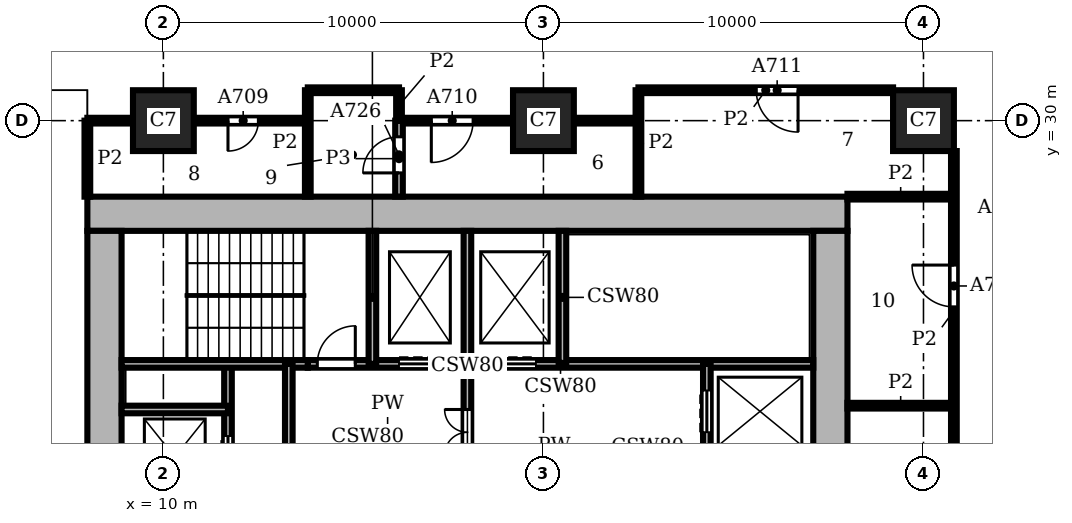
"""IFC4 building model, lengths in metres.
Left out: names, types, materials, properties, quantities, classifications, styles, units other than length and angle.
Written with IfcOpenShell. Run it as: python <this file> out.ifc"""

import sys

from ifc_helpers import new_model, si_unit, direction, frame, frame_2d, origin, origin_2d, place, context, subcontext, project, spatial, rectangle, extrude, element, fill, save


model = new_model("IFC4")
c1 = context("Model", 3, precision=1e-05, world=origin(), true_north=direction((0.0, 1.0)))
c2 = subcontext(c1, "Body", "Model", "MODEL_VIEW")
j1 = project(units=[si_unit("LENGTHUNIT", "METRE"), si_unit("PLANEANGLEUNIT", "RADIAN")], contexts=[c1])
p1 = place(None, origin())
s1 = spatial("IfcSite", under=j1, at=p1, CompositionType="ELEMENT")
p2 = place(p1, origin())
s2 = spatial("IfcBuilding", under=s1, at=p2, CompositionType="ELEMENT")
p3 = place(p2, frame((0.0, 0.0, 86.1)))
s3 = spatial("IfcBuildingStorey", under=s2, at=p3, CompositionType="ELEMENT", Elevation=86.1)
for number, where, z_axis, x_axis in (
    (1, (10.0, 30.0, 0.0), (0.0, 0.0, 1.0), (1.0, 0.0, 0.0)),
    (2, (20.0, 30.0, 0.0), (0.0, 0.0, 1.0), (1.0, 0.0, 0.0)),
    (3, (30.0, 30.0, 0.0), (0.0, 0.0, 1.0), (1.0, 0.0, 0.0)),
):
    element("IfcColumn", number, at=place(p3, frame(where, z_axis=z_axis, x_axis=x_axis)), inside=s3, PredefinedType="COLUMN", context=c2, shape_type="SweptSolid", body=[
        extrude(rectangle(XDim=1.6, YDim=1.6, at=origin_2d()), origin(), (0.0, 0.0, 1.0), 3.9),
    ])
p4 = place(p3, frame((27.55, 8.9, 0.0), z_axis=(0.0, 0.0, 1.0), x_axis=(0.0, 1.0, 0.0)))
e4 = element("IfcWall", 4, at=p4, inside=s3, PredefinedType="SHEAR", context=c2, shape_type="SweptSolid", body=[
    extrude(rectangle(XDim=18.2, YDim=0.9, at=frame_2d((9.1, 0.0))), origin(), (0.0, 0.0, 1.0), 3.9),
])
p5 = place(p4, frame((4.55, 0.0, 0.0)))
e5 = element("IfcOpeningElement", 5, at=p5, cuts=e4, PredefinedType="OPENING", context=c2, shape_type="SweptSolid", body=[
    extrude(rectangle(XDim=1.6, YDim=2.1, at=frame_2d((0.8, 1.05))), frame((0.0, 0.46, 0.0), z_axis=(0.0, -1.0, 0.0), x_axis=(1.0, 0.0, 0.0)), (0.0, 0.0, 1.0), 0.92),
])
p6 = place(p3, frame((28.0, 27.55, 0.0), z_axis=(0.0, 0.0, 1.0), x_axis=(-1.0, 0.0, 0.0)))
e6 = element("IfcWall", 6, at=p6, inside=s3, PredefinedType="SHEAR", context=c2, shape_type="SweptSolid", body=[
    extrude(rectangle(XDim=20.0, YDim=0.9, at=frame_2d((10.0, 0.0))), origin(), (0.0, 0.0, 1.0), 3.9),
])
p7 = place(p3, frame((8.45, 27.1, 0.0), z_axis=(0.0, 0.0, 1.0), x_axis=(0.0, -1.0, 0.0)))
e7 = element("IfcWall", 7, at=p7, inside=s3, PredefinedType="SHEAR", context=c2, shape_type="SweptSolid", body=[
    extrude(rectangle(XDim=18.2, YDim=0.9, at=frame_2d((9.1, 0.0))), origin(), (0.0, 0.0, 1.0), 3.9),
])
p8 = place(p3, frame((8.9, 22.4, 0.0), z_axis=(0.0, 0.0, 1.0), x_axis=(1.0, 0.0, 0.0)))
e8 = element("IfcWall", 8, at=p8, inside=s3, PredefinedType="SHEAR", context=c2, shape_type="SweptSolid", body=[
    extrude(rectangle(XDim=2.8, YDim=0.2, at=frame_2d((1.4, 0.0))), origin(), (0.0, 0.0, 1.0), 3.58),
])
p9 = place(p3, frame((8.9, 23.6, 0.0), z_axis=(0.0, 0.0, 1.0), x_axis=(1.0, 0.0, 0.0)))
e9 = element("IfcWall", 9, at=p9, inside=s3, PredefinedType="SHEAR", context=c2, shape_type="SweptSolid", body=[
    extrude(rectangle(XDim=4.9, YDim=0.2, at=frame_2d((2.45, 0.0))), origin(), (0.0, 0.0, 1.0), 3.58),
])
p10 = place(p3, frame((13.8, 23.6, 0.0), z_axis=(0.0, 0.0, 1.0), x_axis=(1.0, 0.0, 0.0)))
e10 = element("IfcWall", 10, at=p10, inside=s3, PredefinedType="SHEAR", context=c2, shape_type="SweptSolid", body=[
    extrude(rectangle(XDim=13.3, YDim=0.2, at=frame_2d((6.65, 0.0))), origin(), (0.0, 0.0, 1.0), 3.58),
])
p11 = place(p10, frame((2.4, 0.0, 0.0)))
e11 = element("IfcOpeningElement", 11, at=p11, cuts=e10, PredefinedType="OPENING", context=c2, shape_type="SweptSolid", body=[
    extrude(rectangle(XDim=1.1, YDim=2.1, at=frame_2d((0.55, 1.05))), frame((0.0, 0.11, 0.0), z_axis=(0.0, -1.0, 0.0), x_axis=(1.0, 0.0, 0.0)), (0.0, 0.0, 1.0), 0.22),
])
p12 = place(p10, frame((4.9, 0.0, 0.0)))
e12 = element("IfcOpeningElement", 12, at=p12, cuts=e10, PredefinedType="OPENING", context=c2, shape_type="SweptSolid", body=[
    extrude(rectangle(XDim=1.1, YDim=2.1, at=frame_2d((0.55, 1.05))), frame((0.0, 0.11, 0.0), z_axis=(0.0, -1.0, 0.0), x_axis=(1.0, 0.0, 0.0)), (0.0, 0.0, 1.0), 0.22),
])
p13 = place(p10, frame((0.25, 0.0, 0.0)))
e13 = element("IfcOpeningElement", 13, at=p13, cuts=e10, PredefinedType="OPENING", context=c2, shape_type="SweptSolid", body=[
    extrude(rectangle(XDim=1.0, YDim=2.1, at=frame_2d((0.5, 1.05))), frame((0.0, 0.11, 0.0), z_axis=(0.0, -1.0, 0.0), x_axis=(1.0, 0.0, 0.0)), (0.0, 0.0, 1.0), 0.22),
])
p14 = place(p3, frame((11.7, 12.4, 0.0), z_axis=(0.0, 0.0, 1.0), x_axis=(0.0, 1.0, 0.0)))
e14 = element("IfcWall", 14, at=p14, inside=s3, PredefinedType="SHEAR", context=c2, shape_type="SweptSolid", body=[
    extrude(rectangle(XDim=11.2, YDim=0.2, at=frame_2d((5.6, 0.0))), origin(), (0.0, 0.0, 1.0), 3.58),
])
p15 = place(p14, frame((0.7, 0.0, 0.0)))
e15 = element("IfcOpeningElement", 15, at=p15, cuts=e14, PredefinedType="OPENING", context=c2, shape_type="SweptSolid", body=[
    extrude(rectangle(XDim=1.1, YDim=2.1, at=frame_2d((0.55, 1.05))), frame((0.0, 0.11, 0.0), z_axis=(0.0, -1.0, 0.0), x_axis=(1.0, 0.0, 0.0)), (0.0, 0.0, 1.0), 0.22),
])
p16 = place(p14, frame((3.2, 0.0, 0.0)))
e16 = element("IfcOpeningElement", 16, at=p16, cuts=e14, PredefinedType="OPENING", context=c2, shape_type="SweptSolid", body=[
    extrude(rectangle(XDim=1.1, YDim=2.1, at=frame_2d((0.55, 1.05))), frame((0.0, 0.11, 0.0), z_axis=(0.0, -1.0, 0.0), x_axis=(1.0, 0.0, 0.0)), (0.0, 0.0, 1.0), 0.22),
])
p17 = place(p14, frame((5.7, 0.0, 0.0)))
e17 = element("IfcOpeningElement", 17, at=p17, cuts=e14, PredefinedType="OPENING", context=c2, shape_type="SweptSolid", body=[
    extrude(rectangle(XDim=1.1, YDim=2.1, at=frame_2d((0.55, 1.05))), frame((0.0, 0.11, 0.0), z_axis=(0.0, -1.0, 0.0), x_axis=(1.0, 0.0, 0.0)), (0.0, 0.0, 1.0), 0.22),
])
p18 = place(p14, frame((8.2, 0.0, 0.0)))
e18 = element("IfcOpeningElement", 18, at=p18, cuts=e14, PredefinedType="OPENING", context=c2, shape_type="SweptSolid", body=[
    extrude(rectangle(XDim=1.1, YDim=2.1, at=frame_2d((0.55, 1.05))), frame((0.0, 0.11, 0.0), z_axis=(0.0, -1.0, 0.0), x_axis=(1.0, 0.0, 0.0)), (0.0, 0.0, 1.0), 0.22),
])
p19 = place(p3, frame((13.3, 20.0, 0.0), z_axis=(0.0, 0.0, 1.0), x_axis=(0.0, 1.0, 0.0)))
e19 = element("IfcWall", 19, at=p19, inside=s3, PredefinedType="SHEAR", context=c2, shape_type="SweptSolid", body=[
    extrude(rectangle(XDim=3.6, YDim=0.2, at=frame_2d((1.8, 0.0))), origin(), (0.0, 0.0, 1.0), 3.58),
])
p20 = place(p3, frame((15.5, 23.6, 0.0), z_axis=(0.0, 0.0, 1.0), x_axis=(0.0, 1.0, 0.0)))
e20 = element("IfcWall", 20, at=p20, inside=s3, PredefinedType="SHEAR", context=c2, shape_type="SweptSolid", body=[
    extrude(rectangle(XDim=3.5, YDim=0.2, at=frame_2d((1.75, 0.0))), origin(), (0.0, 0.0, 1.0), 3.58),
])
p21 = place(p3, frame((18.0, 20.0, 0.0), z_axis=(0.0, 0.0, 1.0), x_axis=(0.0, 1.0, 0.0)))
e21 = element("IfcWall", 21, at=p21, inside=s3, PredefinedType="SHEAR", context=c2, shape_type="SweptSolid", body=[
    extrude(rectangle(XDim=7.1, YDim=0.2, at=frame_2d((3.55, 0.0))), origin(), (0.0, 0.0, 1.0), 3.58),
])
p22 = place(p21, frame((1.2, 0.0, 0.0)))
e22 = element("IfcOpeningElement", 22, at=p22, cuts=e21, PredefinedType="OPENING", context=c2, shape_type="SweptSolid", body=[
    extrude(rectangle(XDim=1.2, YDim=2.1, at=frame_2d((0.6, 1.05))), frame((0.0, 0.11, 0.0), z_axis=(0.0, -1.0, 0.0), x_axis=(1.0, 0.0, 0.0)), (0.0, 0.0, 1.0), 0.22),
])
p23 = place(p3, frame((20.5, 23.6, 0.0), z_axis=(0.0, 0.0, 1.0), x_axis=(0.0, 1.0, 0.0)))
e23 = element("IfcWall", 23, at=p23, inside=s3, PredefinedType="SHEAR", context=c2, shape_type="SweptSolid", body=[
    extrude(rectangle(XDim=3.5, YDim=0.2, at=frame_2d((1.75, 0.0))), origin(), (0.0, 0.0, 1.0), 3.58),
])
p24 = place(p3, frame((24.3, 16.1, 0.0), z_axis=(0.0, 0.0, 1.0), x_axis=(0.0, 1.0, 0.0)))
e24 = element("IfcWall", 24, at=p24, inside=s3, PredefinedType="SHEAR", context=c2, shape_type="SweptSolid", body=[
    extrude(rectangle(XDim=7.5, YDim=0.2, at=frame_2d((3.75, 0.0))), origin(), (0.0, 0.0, 1.0), 3.58),
])
p25 = place(p24, frame((5.7, 0.0, 0.0)))
e25 = element("IfcOpeningElement", 25, at=p25, cuts=e24, PredefinedType="OPENING", context=c2, shape_type="SweptSolid", body=[
    extrude(rectangle(XDim=1.1, YDim=2.1, at=frame_2d((0.55, 1.05))), frame((0.0, 0.11, 0.0), z_axis=(0.0, -1.0, 0.0), x_axis=(1.0, 0.0, 0.0)), (0.0, 0.0, 1.0), 0.22),
])
p26 = place(p3, frame((8.0, 28.0, 0.0), z_axis=(0.0, 0.0, 1.0), x_axis=(0.0, 1.0, 0.0)))
e26 = element("IfcWall", 26, at=p26, inside=s3, PredefinedType="PARTITIONING", context=c2, shape_type="SweptSolid", body=[
    extrude(rectangle(XDim=2.0, YDim=0.15, at=frame_2d((1.0, 0.0))), origin(), (0.0, 0.0, 1.0), 3.58),
])
p27 = place(p3, frame((13.8, 28.0, 0.0), z_axis=(0.0, 0.0, 1.0), x_axis=(0.0, 1.0, 0.0)))
e27 = element("IfcWall", 27, at=p27, inside=s3, PredefinedType="PARTITIONING", context=c2, shape_type="SweptSolid", body=[
    extrude(rectangle(XDim=2.8, YDim=0.15, at=frame_2d((1.4, 0.0))), origin(), (0.0, 0.0, 1.0), 3.58),
])
p28 = place(p3, frame((16.2, 30.0, 0.0), z_axis=(0.0, 0.0, 1.0), x_axis=(0.0, 1.0, 0.0)))
e28 = element("IfcWall", 28, at=p28, inside=s3, PredefinedType="PARTITIONING", context=c2, shape_type="SweptSolid", body=[
    extrude(rectangle(XDim=0.8, YDim=0.15, at=frame_2d((0.4, 0.0))), origin(), (0.0, 0.0, 1.0), 3.58),
])
p29 = place(p3, frame((22.5, 28.0, 0.0), z_axis=(0.0, 0.0, 1.0), x_axis=(0.0, 1.0, 0.0)))
e29 = element("IfcWall", 29, at=p29, inside=s3, PredefinedType="PARTITIONING", context=c2, shape_type="SweptSolid", body=[
    extrude(rectangle(XDim=2.8, YDim=0.15, at=frame_2d((1.4, 0.0))), origin(), (0.0, 0.0, 1.0), 3.58),
])
p30 = place(p3, frame((30.8, 20.8, 0.0), z_axis=(0.0, 0.0, 1.0), x_axis=(0.0, 1.0, 0.0)))
e30 = element("IfcWall", 30, at=p30, inside=s3, PredefinedType="PARTITIONING", context=c2, shape_type="SweptSolid", body=[
    extrude(rectangle(XDim=8.4, YDim=0.15, at=frame_2d((4.2, 0.0))), origin(), (0.0, 0.0, 1.0), 3.58),
])
p31 = place(p30, frame((4.3, 0.0, 0.0)))
e31 = element("IfcOpeningElement", 31, at=p31, cuts=e30, PredefinedType="OPENING", context=c2, shape_type="SweptSolid", body=[
    extrude(rectangle(XDim=1.1, YDim=2.1, at=frame_2d((0.55, 1.05))), frame((0.0, 0.085, 0.0), z_axis=(0.0, -1.0, 0.0), x_axis=(1.0, 0.0, 0.0)), (0.0, 0.0, 1.0), 0.17),
])
for number, where, z_axis, x_axis in (
    (32, (28.0, 22.5, 0.0), (0.0, 0.0, 1.0), (1.0, 0.0, 0.0)),
    (33, (28.0, 28.0, 0.0), (0.0, 0.0, 1.0), (1.0, 0.0, 0.0)),
):
    element("IfcWall", number, at=place(p3, frame(where, z_axis=z_axis, x_axis=x_axis)), inside=s3, PredefinedType="PARTITIONING", context=c2, shape_type="SweptSolid", body=[
        extrude(rectangle(XDim=2.8, YDim=0.15, at=frame_2d((1.4, 0.0))), origin(), (0.0, 0.0, 1.0), 3.58),
    ])
p32 = place(p3, frame((8.0, 30.0, 0.0), z_axis=(0.0, 0.0, 1.0), x_axis=(1.0, 0.0, 0.0)))
e34 = element("IfcWall", 34, at=p32, inside=s3, PredefinedType="PARTITIONING", context=c2, shape_type="SweptSolid", body=[
    extrude(rectangle(XDim=1.2, YDim=0.15, at=frame_2d((0.6, 0.0))), origin(), (0.0, 0.0, 1.0), 3.58),
])
p33 = place(p3, frame((10.8, 30.0, 0.0), z_axis=(0.0, 0.0, 1.0), x_axis=(1.0, 0.0, 0.0)))
e35 = element("IfcWall", 35, at=p33, inside=s3, PredefinedType="PARTITIONING", context=c2, shape_type="SweptSolid", body=[
    extrude(rectangle(XDim=3.0, YDim=0.15, at=frame_2d((1.5, 0.0))), origin(), (0.0, 0.0, 1.0), 3.58),
])
p34 = place(p33, frame((0.9, 0.0, 0.0)))
e36 = element("IfcOpeningElement", 36, at=p34, cuts=e35, PredefinedType="OPENING", context=c2, shape_type="SweptSolid", body=[
    extrude(rectangle(XDim=0.8, YDim=2.1, at=frame_2d((0.4, 1.05))), frame((0.0, 0.085, 0.0), z_axis=(0.0, -1.0, 0.0), x_axis=(1.0, 0.0, 0.0)), (0.0, 0.0, 1.0), 0.17),
])
p35 = place(p3, frame((16.2, 30.0, 0.0), z_axis=(0.0, 0.0, 1.0), x_axis=(1.0, 0.0, 0.0)))
e37 = element("IfcWall", 37, at=p35, inside=s3, PredefinedType="PARTITIONING", context=c2, shape_type="SweptSolid", body=[
    extrude(rectangle(XDim=3.0, YDim=0.15, at=frame_2d((1.5, 0.0))), origin(), (0.0, 0.0, 1.0), 3.58),
])
p36 = place(p35, frame((0.85, 0.0, 0.0)))
e38 = element("IfcOpeningElement", 38, at=p36, cuts=e37, PredefinedType="OPENING", context=c2, shape_type="SweptSolid", body=[
    extrude(rectangle(XDim=1.1, YDim=2.1, at=frame_2d((0.55, 1.05))), frame((0.0, 0.085, 0.0), z_axis=(0.0, -1.0, 0.0), x_axis=(1.0, 0.0, 0.0)), (0.0, 0.0, 1.0), 0.17),
])
p37 = place(p3, frame((20.8, 30.0, 0.0), z_axis=(0.0, 0.0, 1.0), x_axis=(1.0, 0.0, 0.0)))
e39 = element("IfcWall", 39, at=p37, inside=s3, PredefinedType="PARTITIONING", context=c2, shape_type="SweptSolid", body=[
    extrude(rectangle(XDim=1.7, YDim=0.15, at=frame_2d((0.85, 0.0))), origin(), (0.0, 0.0, 1.0), 3.58),
])
p38 = place(p3, frame((13.8, 30.8, 0.0), z_axis=(0.0, 0.0, 1.0), x_axis=(1.0, 0.0, 0.0)))
e40 = element("IfcWall", 40, at=p38, inside=s3, PredefinedType="PARTITIONING", context=c2, shape_type="SweptSolid", body=[
    extrude(rectangle(XDim=2.4, YDim=0.15, at=frame_2d((1.2, 0.0))), origin(), (0.0, 0.0, 1.0), 3.58),
])
p39 = place(p3, frame((22.5, 30.8, 0.0), z_axis=(0.0, 0.0, 1.0), x_axis=(1.0, 0.0, 0.0)))
e41 = element("IfcWall", 41, at=p39, inside=s3, PredefinedType="PARTITIONING", context=c2, shape_type="SweptSolid", body=[
    extrude(rectangle(XDim=6.7, YDim=0.15, at=frame_2d((3.35, 0.0))), origin(), (0.0, 0.0, 1.0), 3.58),
])
p40 = place(p39, frame((3.1, 0.0, 0.0)))
e42 = element("IfcOpeningElement", 42, at=p40, cuts=e41, PredefinedType="OPENING", context=c2, shape_type="SweptSolid", body=[
    extrude(rectangle(XDim=1.1, YDim=2.1, at=frame_2d((0.55, 1.05))), frame((0.0, 0.085, 0.0), z_axis=(0.0, -1.0, 0.0), x_axis=(1.0, 0.0, 0.0)), (0.0, 0.0, 1.0), 0.17),
])
p41 = place(p3, frame((16.2, 28.0, 0.0), z_axis=(0.0, 0.0, 1.0), x_axis=(0.0, 1.0, 0.0)))
e43 = element("IfcWall", 43, at=p41, inside=s3, PredefinedType="PARTITIONING", context=c2, shape_type="SweptSolid", body=[
    extrude(rectangle(XDim=2.0, YDim=0.2, at=frame_2d((1.0, 0.0))), origin(), (0.0, 0.0, 1.0), 3.58),
])
p42 = place(p41, frame((0.625, 0.0, 0.0)))
e44 = element("IfcOpeningElement", 44, at=p42, cuts=e43, PredefinedType="OPENING", context=c2, shape_type="SweptSolid", body=[
    extrude(rectangle(XDim=0.95, YDim=2.1, at=frame_2d((0.475, 1.05))), frame((0.0, 0.11, 0.0), z_axis=(0.0, -1.0, 0.0), x_axis=(1.0, 0.0, 0.0)), (0.0, 0.0, 1.0), 0.22),
])
p43 = place(p18, origin())
e45 = element("IfcDoor", 45, at=p43, inside=s3, OperationType="DOUBLE_DOOR_SLIDING", PredefinedType="DOOR", context=c2, shape_type="SweptSolid", body=[
    extrude(rectangle(XDim=1.1, YDim=2.1, at=frame_2d((0.55, 1.05))), frame((0.0, 0.025, 0.0), z_axis=(0.0, -1.0, 0.0), x_axis=(1.0, 0.0, 0.0)), (0.0, 0.0, 1.0), 0.05),
])
fill(e18, e45)
p44 = place(p25, origin())
e46 = element("IfcDoor", 46, at=p44, inside=s3, OperationType="DOUBLE_DOOR_SLIDING", PredefinedType="DOOR", context=c2, shape_type="SweptSolid", body=[
    extrude(rectangle(XDim=1.1, YDim=2.1, at=frame_2d((0.55, 1.05))), frame((0.0, 0.025, 0.0), z_axis=(0.0, -1.0, 0.0), x_axis=(1.0, 0.0, 0.0)), (0.0, 0.0, 1.0), 0.05),
])
fill(e25, e46)
p45 = place(p11, origin())
e47 = element("IfcDoor", 47, at=p45, inside=s3, OperationType="DOUBLE_DOOR_SLIDING", PredefinedType="DOOR", context=c2, shape_type="SweptSolid", body=[
    extrude(rectangle(XDim=1.1, YDim=2.1, at=frame_2d((0.55, 1.05))), frame((0.0, 0.025, 0.0), z_axis=(0.0, -1.0, 0.0), x_axis=(1.0, 0.0, 0.0)), (0.0, 0.0, 1.0), 0.05),
])
fill(e11, e47)
p46 = place(p12, origin())
e48 = element("IfcDoor", 48, at=p46, inside=s3, OperationType="DOUBLE_DOOR_SLIDING", PredefinedType="DOOR", context=c2, shape_type="SweptSolid", body=[
    extrude(rectangle(XDim=1.1, YDim=2.1, at=frame_2d((0.55, 1.05))), frame((0.0, 0.025, 0.0), z_axis=(0.0, -1.0, 0.0), x_axis=(1.0, 0.0, 0.0)), (0.0, 0.0, 1.0), 0.05),
])
fill(e12, e48)
p47 = place(p13, origin())
e49 = element("IfcDoor", 49, at=p47, inside=s3, OperationType="SINGLE_SWING_RIGHT", PredefinedType="DOOR", context=c2, shape_type="SweptSolid", body=[
    extrude(rectangle(XDim=1.0, YDim=2.1, at=frame_2d((0.5, 1.05))), frame((0.0, 0.025, 0.0), z_axis=(0.0, -1.0, 0.0), x_axis=(1.0, 0.0, 0.0)), (0.0, 0.0, 1.0), 0.05),
])
fill(e13, e49)
p48 = place(p22, origin())
e50 = element("IfcDoor", 50, at=p48, inside=s3, OperationType="DOUBLE_DOOR_SINGLE_SWING", PredefinedType="DOOR", context=c2, shape_type="SweptSolid", body=[
    extrude(rectangle(XDim=1.2, YDim=2.1, at=frame_2d((0.6, 1.05))), frame((0.0, 0.025, 0.0), z_axis=(0.0, -1.0, 0.0), x_axis=(1.0, 0.0, 0.0)), (0.0, 0.0, 1.0), 0.05),
])
fill(e22, e50)
p49 = place(p31, origin())
e51 = element("IfcDoor", 51, at=p49, inside=s3, OperationType="SINGLE_SWING_RIGHT", PredefinedType="DOOR", context=c2, shape_type="SweptSolid", body=[
    extrude(rectangle(XDim=1.1, YDim=2.1, at=frame_2d((0.55, 1.05))), frame((0.0, 0.025, 0.0), z_axis=(0.0, -1.0, 0.0), x_axis=(1.0, 0.0, 0.0)), (0.0, 0.0, 1.0), 0.05),
])
fill(e31, e51)
p50 = place(p34, frame((0.8, 0.0, 0.0), z_axis=(0.0, 0.0, 1.0), x_axis=(-1.0, 0.0, 0.0)))
e52 = element("IfcDoor", 52, at=p50, inside=s3, OperationType="SINGLE_SWING_RIGHT", PredefinedType="DOOR", context=c2, shape_type="SweptSolid", body=[
    extrude(rectangle(XDim=0.8, YDim=2.1, at=frame_2d((0.4, 1.05))), frame((0.0, 0.025, 0.0), z_axis=(0.0, -1.0, 0.0), x_axis=(1.0, 0.0, 0.0)), (0.0, 0.0, 1.0), 0.05),
])
fill(e36, e52)
p51 = place(p36, frame((1.1, 0.0, 0.0), z_axis=(0.0, 0.0, 1.0), x_axis=(-1.0, 0.0, 0.0)))
e53 = element("IfcDoor", 53, at=p51, inside=s3, OperationType="SINGLE_SWING_RIGHT", PredefinedType="DOOR", context=c2, shape_type="SweptSolid", body=[
    extrude(rectangle(XDim=1.1, YDim=2.1, at=frame_2d((0.55, 1.05))), frame((0.0, 0.025, 0.0), z_axis=(0.0, -1.0, 0.0), x_axis=(1.0, 0.0, 0.0)), (0.0, 0.0, 1.0), 0.05),
])
fill(e38, e53)
p52 = place(p40, frame((1.1, 0.0, 0.0), z_axis=(0.0, 0.0, 1.0), x_axis=(-1.0, 0.0, 0.0)))
e54 = element("IfcDoor", 54, at=p52, inside=s3, OperationType="SINGLE_SWING_LEFT", PredefinedType="DOOR", context=c2, shape_type="SweptSolid", body=[
    extrude(rectangle(XDim=1.1, YDim=2.1, at=frame_2d((0.55, 1.05))), frame((0.0, 0.025, 0.0), z_axis=(0.0, -1.0, 0.0), x_axis=(1.0, 0.0, 0.0)), (0.0, 0.0, 1.0), 0.05),
])
fill(e42, e54)
p53 = place(p42, origin())
e55 = element("IfcDoor", 55, at=p53, inside=s3, OperationType="SINGLE_SWING_LEFT", PredefinedType="DOOR", context=c2, shape_type="SweptSolid", body=[
    extrude(rectangle(XDim=0.95, YDim=2.1, at=frame_2d((0.475, 1.05))), frame((0.0, 0.025, 0.0), z_axis=(0.0, -1.0, 0.0), x_axis=(1.0, 0.0, 0.0)), (0.0, 0.0, 1.0), 0.05),
])
fill(e44, e55)
save(model, sys.argv[1])
